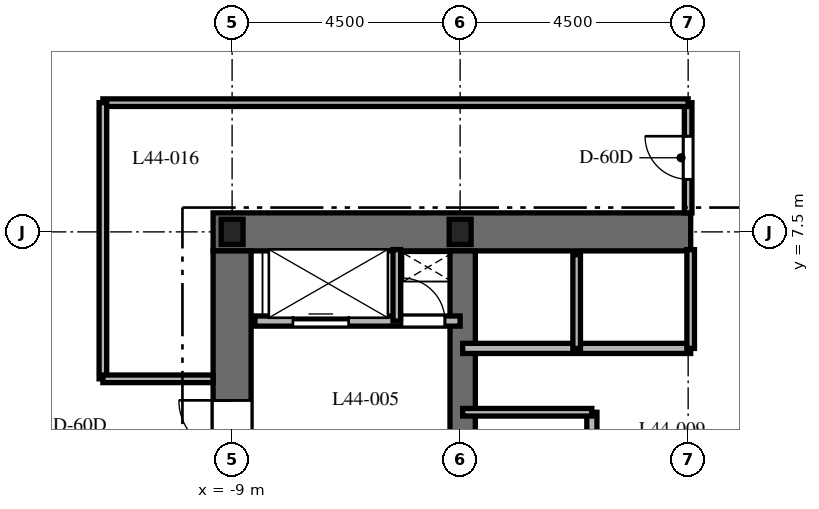
"""IFC4 building model, lengths in metres.
Left out: names, types, materials, properties, quantities, classifications, styles, units other than length and angle.
Written with IfcOpenShell. Run it as: python <this file> out.ifc"""

import sys

from ifc_helpers import new_model, si_unit, direction, frame, frame_2d, origin, origin_2d, place, context, subcontext, project, spatial, rectangle, i_section, extrude, element, fill, save


model = new_model("IFC4")
c1 = context("Model", 3, precision=1e-05, world=origin(), true_north=direction((0.0, 1.0)))
c2 = subcontext(c1, "Body", "Model", "MODEL_VIEW")
j1 = project(units=[si_unit("LENGTHUNIT", "METRE"), si_unit("PLANEANGLEUNIT", "RADIAN")], contexts=[c1])
p1 = place(None, origin())
s1 = spatial("IfcSite", under=j1, at=p1, CompositionType="ELEMENT")
p2 = place(p1, origin())
s2 = spatial("IfcBuilding", under=s1, at=p2, CompositionType="ELEMENT")
p3 = place(p2, frame((0.0, 0.0, 179.3)))
s3 = spatial("IfcBuildingStorey", under=s2, at=p3, CompositionType="ELEMENT", Elevation=179.3)
p4 = place(p3, frame((-9.375, 7.5, 0.0), z_axis=(0.0, 0.0, 1.0), x_axis=(1.0, 0.0, 0.0)))
e1 = element("IfcWall", 1, at=p4, inside=s3, PredefinedType="SHEAR", context=c2, shape_type="SweptSolid", body=[
    extrude(rectangle(XDim=9.425, YDim=0.75, at=frame_2d((4.712, 0.0))), origin(), (0.0, 0.0, 1.0), 3.7),
])
p5 = place(p3, frame((-9.0, -7.125, 0.0), z_axis=(0.0, 0.0, 1.0), x_axis=(0.0, 1.0, 0.0)))
e2 = element("IfcWall", 2, at=p5, inside=s3, PredefinedType="SHEAR", context=c2, shape_type="SweptSolid", body=[
    extrude(rectangle(XDim=14.25, YDim=0.75, at=frame_2d((7.125, 0.0))), origin(), (0.0, 0.0, 1.0), 3.7),
])
p6 = place(p5, frame((10.25, 0.0, 0.0)))
e3 = element("IfcOpeningElement", 3, at=p6, cuts=e2, PredefinedType="OPENING", context=c2, shape_type="SweptSolid", body=[
    extrude(rectangle(XDim=1.05, YDim=2.15, at=frame_2d((0.525, 1.075))), frame((0.0, 0.385, 0.0), z_axis=(0.0, -1.0, 0.0), x_axis=(1.0, 0.0, 0.0)), (0.0, 0.0, 1.0), 0.77),
])
p7 = place(p3, frame((-4.45, 2.25, 0.0), z_axis=(0.0, 0.0, 1.0), x_axis=(0.0, 1.0, 0.0)))
e4 = element("IfcWall", 4, at=p7, inside=s3, PredefinedType="SHEAR", context=c2, shape_type="SweptSolid", body=[
    extrude(rectangle(XDim=4.875, YDim=0.5, at=frame_2d((2.438, 0.0))), origin(), (0.0, 0.0, 1.0), 3.7),
])
for number, where, z_axis, x_axis in (
    (5, (-4.5, 7.5, 0.0), (0.0, 0.0, 1.0), (1.0, 0.0, 0.0)),
    (6, (-9.0, 7.5, 0.0), (0.0, 0.0, 1.0), (1.0, 0.0, 0.0)),
):
    element("IfcColumn", number, at=place(p3, frame(where, z_axis=z_axis, x_axis=x_axis)), inside=s3, PredefinedType="COLUMN", context=c2, shape_type="SweptSolid", body=[
        extrude(i_section(OverallWidth=0.432, OverallDepth=0.498, WebThickness=0.056, FlangeThickness=0.089, at=origin_2d()), origin(), (0.0, 0.0, 1.0), 3.7),
    ])
p8 = place(p3, frame((-8.55, 5.74, 0.0), z_axis=(0.0, 0.0, 1.0), x_axis=(1.0, 0.0, 0.0)))
e7 = element("IfcWall", 7, at=p8, inside=s3, PredefinedType="PARTITIONING", context=c2, shape_type="SweptSolid", body=[
    extrude(rectangle(XDim=4.05, YDim=0.2, at=frame_2d((2.025, 0.0))), origin(), (0.0, 0.0, 1.0), 3.4),
])
p9 = place(p8, frame((0.75, 0.0, 0.0)))
e8 = element("IfcOpeningElement", 8, at=p9, cuts=e7, PredefinedType="OPENING", context=c2, shape_type="SweptSolid", body=[
    extrude(rectangle(XDim=1.1, YDim=2.2, at=frame_2d((0.55, 1.1))), frame((0.0, 0.11, 0.0), z_axis=(0.0, -1.0, 0.0), x_axis=(1.0, 0.0, 0.0)), (0.0, 0.0, 1.0), 0.22),
])
p10 = place(p8, frame((2.9, 0.0, 0.0)))
e9 = element("IfcOpeningElement", 9, at=p10, cuts=e7, PredefinedType="OPENING", context=c2, shape_type="SweptSolid", body=[
    extrude(rectangle(XDim=0.85, YDim=2.03, at=frame_2d((0.425, 1.015))), frame((0.0, 0.11, 0.0), z_axis=(0.0, -1.0, 0.0), x_axis=(1.0, 0.0, 0.0)), (0.0, 0.0, 1.0), 0.22),
])
p11 = place(p3, frame((-5.75, 5.74, 0.0), z_axis=(0.0, 0.0, 1.0), x_axis=(0.0, 1.0, 0.0)))
e10 = element("IfcWall", 10, at=p11, inside=s3, PredefinedType="PARTITIONING", context=c2, shape_type="SweptSolid", body=[
    extrude(rectangle(XDim=1.41, YDim=0.15, at=frame_2d((0.705, 0.0))), origin(), (0.0, 0.0, 1.0), 3.4),
])
p12 = place(p3, frame((-4.45, 5.2, 0.0), z_axis=(0.0, 0.0, 1.0), x_axis=(1.0, 0.0, 0.0)))
e11 = element("IfcWall", 11, at=p12, inside=s3, PredefinedType="PARTITIONING", context=c2, shape_type="SweptSolid", body=[
    extrude(rectangle(XDim=4.5, YDim=0.2, at=frame_2d((2.25, 0.0))), origin(), (0.0, 0.0, 1.0), 3.4),
])
p13 = place(p3, frame((-2.2, 5.2, 0.0), z_axis=(0.0, 0.0, 1.0), x_axis=(0.0, 1.0, 0.0)))
e12 = element("IfcWall", 12, at=p13, inside=s3, PredefinedType="PARTITIONING", context=c2, shape_type="SweptSolid", body=[
    extrude(rectangle(XDim=1.85, YDim=0.15, at=frame_2d((0.925, 0.0))), origin(), (0.0, 0.0, 1.0), 3.4),
])
p14 = place(p3, frame((0.05, 5.2, 0.0), z_axis=(0.0, 0.0, 1.0), x_axis=(0.0, 1.0, 0.0)))
e13 = element("IfcWall", 13, at=p14, inside=s3, PredefinedType="PARTITIONING", context=c2, shape_type="SweptSolid", body=[
    extrude(rectangle(XDim=1.95, YDim=0.15, at=frame_2d((0.975, 0.0))), origin(), (0.0, 0.0, 1.0), 3.4),
])
p15 = place(p3, frame((-1.9, -0.5, 0.0), z_axis=(0.0, 0.0, 1.0), x_axis=(0.0, 1.0, 0.0)))
e14 = element("IfcWall", 14, at=p15, inside=s3, PredefinedType="PARTITIONING", context=c2, shape_type="SweptSolid", body=[
    extrude(rectangle(XDim=4.44, YDim=0.2, at=frame_2d((2.22, 0.0))), origin(), (0.0, 0.0, 1.0), 3.4),
])
p16 = place(p15, frame((1.5, 0.0, 0.0)))
e15 = element("IfcOpeningElement", 15, at=p16, cuts=e14, PredefinedType="OPENING", context=c2, shape_type="SweptSolid", body=[
    extrude(rectangle(XDim=0.85, YDim=2.03, at=frame_2d((0.425, 1.015))), frame((0.0, 0.11, 0.0), z_axis=(0.0, -1.0, 0.0), x_axis=(1.0, 0.0, 0.0)), (0.0, 0.0, 1.0), 0.22),
])
p17 = place(p3, frame((-4.45, 3.94, 0.0), z_axis=(0.0, 0.0, 1.0), x_axis=(1.0, 0.0, 0.0)))
e16 = element("IfcWall", 16, at=p17, inside=s3, PredefinedType="PARTITIONING", context=c2, shape_type="SweptSolid", body=[
    extrude(rectangle(XDim=2.55, YDim=0.15, at=frame_2d((1.275, 0.0))), origin(), (0.0, 0.0, 1.0), 3.4),
])
p18 = place(p3, frame((0.0, 7.875, 0.0), z_axis=(0.0, 0.0, 1.0), x_axis=(0.0, 1.0, 0.0)))
e17 = element("IfcWall", 17, at=p18, inside=s3, PredefinedType="PARTITIONING", context=c2, shape_type="SweptSolid", body=[
    extrude(rectangle(XDim=2.175, YDim=0.15, at=frame_2d((1.087, 0.0))), origin(), (0.0, 0.0, 1.0), 3.4),
])
p19 = place(p18, frame((0.663, 0.0, 0.0)))
e18 = element("IfcOpeningElement", 18, at=p19, cuts=e17, PredefinedType="OPENING", context=c2, shape_type="SweptSolid", body=[
    extrude(rectangle(XDim=0.85, YDim=2.03, at=frame_2d((0.425, 1.015))), frame((0.0, 0.085, 0.0), z_axis=(0.0, -1.0, 0.0), x_axis=(1.0, 0.0, 0.0)), (0.0, 0.0, 1.0), 0.17),
])
p20 = place(p3, frame((0.0, 10.05, 0.0), z_axis=(0.0, 0.0, 1.0), x_axis=(-1.0, 0.0, 0.0)))
e19 = element("IfcWall", 19, at=p20, inside=s3, PredefinedType="PARTITIONING", context=c2, shape_type="SweptSolid", body=[
    extrude(rectangle(XDim=11.55, YDim=0.15, at=frame_2d((5.775, 0.0))), origin(), (0.0, 0.0, 1.0), 2.84),
])
p21 = place(p3, frame((-11.55, 10.05, 0.0), z_axis=(0.0, 0.0, 1.0), x_axis=(0.0, -1.0, 0.0)))
e20 = element("IfcWall", 20, at=p21, inside=s3, PredefinedType="PARTITIONING", context=c2, shape_type="SweptSolid", body=[
    extrude(rectangle(XDim=5.45, YDim=0.15, at=frame_2d((2.725, 0.0))), origin(), (0.0, 0.0, 1.0), 2.84),
])
p22 = place(p3, frame((-11.55, 4.6, 0.0), z_axis=(0.0, 0.0, 1.0), x_axis=(1.0, 0.0, 0.0)))
e21 = element("IfcWall", 21, at=p22, inside=s3, PredefinedType="PARTITIONING", context=c2, shape_type="SweptSolid", body=[
    extrude(rectangle(XDim=2.175, YDim=0.15, at=frame_2d((1.087, 0.0))), origin(), (0.0, 0.0, 1.0), 3.4),
])
p23 = place(p6, origin())
e22 = element("IfcDoor", 22, at=p23, inside=s3, OperationType="SINGLE_SWING_RIGHT", PredefinedType="DOOR", context=c2, shape_type="SweptSolid", body=[
    extrude(rectangle(XDim=1.05, YDim=2.15, at=frame_2d((0.525, 1.075))), frame((0.0, 0.025, 0.0), z_axis=(0.0, -1.0, 0.0), x_axis=(1.0, 0.0, 0.0)), (0.0, 0.0, 1.0), 0.05),
])
fill(e3, e22)
p24 = place(p9, origin())
e23 = element("IfcDoor", 23, at=p24, inside=s3, OperationType="SLIDING_TO_LEFT", PredefinedType="DOOR", context=c2, shape_type="SweptSolid", body=[
    extrude(rectangle(XDim=1.1, YDim=2.2, at=frame_2d((0.55, 1.1))), frame((0.0, 0.025, 0.0), z_axis=(0.0, -1.0, 0.0), x_axis=(1.0, 0.0, 0.0)), (0.0, 0.0, 1.0), 0.05),
])
fill(e8, e23)
p25 = place(p10, origin())
e24 = element("IfcDoor", 24, at=p25, inside=s3, OperationType="SINGLE_SWING_LEFT", PredefinedType="DOOR", context=c2, shape_type="SweptSolid", body=[
    extrude(rectangle(XDim=0.85, YDim=2.03, at=frame_2d((0.425, 1.015))), frame((0.0, 0.025, 0.0), z_axis=(0.0, -1.0, 0.0), x_axis=(1.0, 0.0, 0.0)), (0.0, 0.0, 1.0), 0.05),
])
fill(e9, e24)
p26 = place(p19, origin())
e25 = element("IfcDoor", 25, at=p26, inside=s3, OperationType="SINGLE_SWING_RIGHT", PredefinedType="DOOR", context=c2, shape_type="SweptSolid", body=[
    extrude(rectangle(XDim=0.85, YDim=2.03, at=frame_2d((0.425, 1.015))), frame((0.0, 0.025, 0.0), z_axis=(0.0, -1.0, 0.0), x_axis=(1.0, 0.0, 0.0)), (0.0, 0.0, 1.0), 0.05),
])
fill(e18, e25)
save(model, sys.argv[1])
